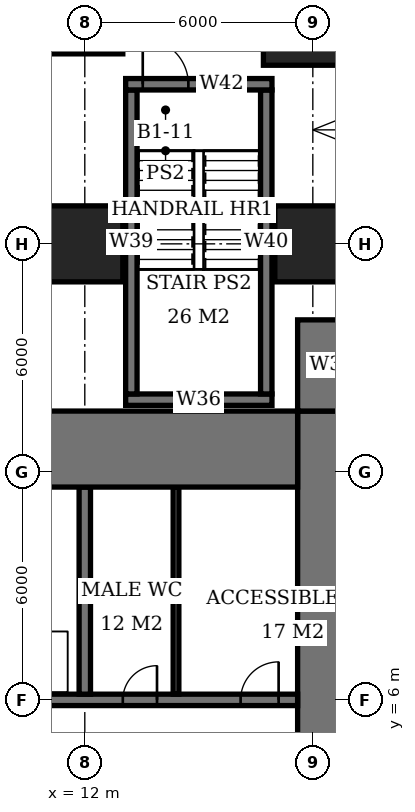
"""IFC4 building model, lengths in metres.
Left out: names, types, materials, properties, quantities, classifications, styles, units other than length and angle.
Written with IfcOpenShell. Run it as: python <this file> out.ifc"""

import sys

from ifc_helpers import new_model, si_unit, direction, frame, frame_2d, origin, origin_2d, place, context, subcontext, project, spatial, rectangle, extrude, element, fill, save


model = new_model("IFC4")
c1 = context("Model", 3, precision=1e-05, world=origin(), true_north=direction((0.0, 1.0)))
c2 = subcontext(c1, "Body", "Model", "MODEL_VIEW")
j1 = project(units=[si_unit("LENGTHUNIT", "METRE"), si_unit("PLANEANGLEUNIT", "RADIAN")], contexts=[c1])
p1 = place(None, origin())
s1 = spatial("IfcSite", under=j1, at=p1, CompositionType="ELEMENT")
p2 = place(p1, origin())
s2 = spatial("IfcBuilding", under=s1, at=p2, CompositionType="ELEMENT")
p3 = place(p2, frame((0.0, 0.0, -4.5)))
s3 = spatial("IfcBuildingStorey", under=s2, at=p3, CompositionType="ELEMENT", Elevation=-4.5)
p4 = place(p3, frame((12.0, 18.0, 0.0), z_axis=(0.0, 0.0, 1.0), x_axis=(1.0, 0.0, 0.0)))
e1 = element("IfcColumn", 1, at=p4, inside=s3, PredefinedType="COLUMN", context=c2, shape_type="SweptSolid", body=[
    extrude(rectangle(XDim=2.0, YDim=2.0, at=origin_2d()), origin(), (0.0, 0.0, 1.0), 4.5),
])
p5 = place(p3, frame((12.0, 24.0, 0.0), z_axis=(0.0, 0.0, 1.0), x_axis=(1.0, 0.0, 0.0)))
e2 = element("IfcColumn", 2, at=p5, inside=s3, PredefinedType="COLUMN", context=c2, shape_type="SweptSolid", body=[
    extrude(rectangle(XDim=2.0, YDim=2.0, at=origin_2d()), origin(), (0.0, 0.0, 1.0), 4.05),
])
p6 = place(p3, frame((18.0, 18.0, 0.0), z_axis=(0.0, 0.0, 1.0), x_axis=(1.0, 0.0, 0.0)))
e3 = element("IfcColumn", 3, at=p6, inside=s3, PredefinedType="COLUMN", context=c2, shape_type="SweptSolid", body=[
    extrude(rectangle(XDim=2.0, YDim=2.0, at=origin_2d()), origin(), (0.0, 0.0, 1.0), 4.5),
])
p7 = place(p3, frame((18.0, 24.0, 0.0), z_axis=(0.0, 0.0, 1.0), x_axis=(1.0, 0.0, 0.0)))
e4 = element("IfcColumn", 4, at=p7, inside=s3, PredefinedType="COLUMN", context=c2, shape_type="SweptSolid", body=[
    extrude(rectangle(XDim=2.6, YDim=2.6, at=origin_2d()), origin(), (0.0, 0.0, 1.0), 4.05),
])
p8 = place(p3, frame((-5.6, 12.6, 0.0), z_axis=(0.0, 0.0, 1.0), x_axis=(1.0, 0.0, 0.0)))
e5 = element("IfcWall", 5, at=p8, inside=s3, PredefinedType="SHEAR", context=c2, shape_type="SweptSolid", body=[
    extrude(rectangle(XDim=23.2, YDim=2.0, at=frame_2d((11.6, 0.0))), origin(), (0.0, 0.0, 1.0), 4.5),
])
p9 = place(p3, frame((18.5, -7.6, 0.0), z_axis=(0.0, 0.0, 1.0), x_axis=(0.0, 1.0, 0.0)))
e6 = element("IfcWall", 6, at=p9, inside=s3, PredefinedType="SHEAR", context=c2, shape_type="SweptSolid", body=[
    extrude(rectangle(XDim=21.2, YDim=1.8, at=frame_2d((10.6, 0.0))), origin(), (0.0, 0.0, 1.0), 4.5),
])
p10 = place(p9, frame((9.2, 0.0, 0.0)))
e7 = element("IfcOpeningElement", 7, at=p10, cuts=e6, PredefinedType="OPENING", context=c2, shape_type="SweptSolid", body=[
    extrude(rectangle(XDim=1.8, YDim=2.4, at=frame_2d((0.9, 1.2))), frame((0.0, 0.91, 0.0), z_axis=(0.0, -1.0, 0.0), x_axis=(1.0, 0.0, 0.0)), (0.0, 0.0, 1.0), 1.82),
])
p11 = place(p3, frame((18.5, 13.6, 0.0), z_axis=(0.0, 0.0, 1.0), x_axis=(0.0, 1.0, 0.0)))
e8 = element("IfcWall", 8, at=p11, inside=s3, PredefinedType="SHEAR", context=c2, shape_type="SweptSolid", body=[
    extrude(rectangle(XDim=2.4, YDim=1.8, at=frame_2d((1.2, 0.0))), origin(), (0.0, 0.0, 1.0), 4.5),
])
p12 = place(p3, frame((-0.15, 6.0, 0.0), z_axis=(0.0, 0.0, 1.0), x_axis=(1.0, 0.0, 0.0)))
e9 = element("IfcWall", 9, at=p12, inside=s3, PredefinedType="SHEAR", context=c2, shape_type="SweptSolid", body=[
    extrude(rectangle(XDim=17.75, YDim=0.3, at=frame_2d((8.875, 0.0))), origin(), (0.0, 0.0, 1.0), 4.5),
])
p13 = place(p12, frame((13.15, 0.0, 0.0)))
e10 = element("IfcOpeningElement", 10, at=p13, cuts=e9, PredefinedType="OPENING", context=c2, shape_type="SweptSolid", body=[
    extrude(rectangle(XDim=0.9, YDim=2.1, at=frame_2d((0.45, 1.05))), frame((0.0, 0.16, 0.0), z_axis=(0.0, -1.0, 0.0), x_axis=(1.0, 0.0, 0.0)), (0.0, 0.0, 1.0), 0.32),
])
p14 = place(p12, frame((16.25, 0.0, 0.0)))
e11 = element("IfcOpeningElement", 11, at=p14, cuts=e9, PredefinedType="OPENING", context=c2, shape_type="SweptSolid", body=[
    extrude(rectangle(XDim=1.0, YDim=2.1, at=frame_2d((0.5, 1.05))), frame((0.0, 0.16, 0.0), z_axis=(0.0, -1.0, 0.0), x_axis=(1.0, 0.0, 0.0)), (0.0, 0.0, 1.0), 0.32),
])
p15 = place(p12, frame((1.1, 0.0, 0.0)))
e12 = element("IfcOpeningElement", 12, at=p15, cuts=e9, PredefinedType="OPENING", context=c2, shape_type="SweptSolid", body=[
    extrude(rectangle(XDim=1.1, YDim=2.1, at=frame_2d((0.55, 1.05))), frame((0.0, 0.16, 0.0), z_axis=(0.0, -1.0, 0.0), x_axis=(1.0, 0.0, 0.0)), (0.0, 0.0, 1.0), 0.32),
])
p16 = place(p12, frame((4.1, 0.0, 0.0)))
e13 = element("IfcOpeningElement", 13, at=p16, cuts=e9, PredefinedType="OPENING", context=c2, shape_type="SweptSolid", body=[
    extrude(rectangle(XDim=1.1, YDim=2.1, at=frame_2d((0.55, 1.05))), frame((0.0, 0.16, 0.0), z_axis=(0.0, -1.0, 0.0), x_axis=(1.0, 0.0, 0.0)), (0.0, 0.0, 1.0), 0.32),
])
p17 = place(p12, frame((7.1, 0.0, 0.0)))
e14 = element("IfcOpeningElement", 14, at=p17, cuts=e9, PredefinedType="OPENING", context=c2, shape_type="SweptSolid", body=[
    extrude(rectangle(XDim=1.1, YDim=2.1, at=frame_2d((0.55, 1.05))), frame((0.0, 0.16, 0.0), z_axis=(0.0, -1.0, 0.0), x_axis=(1.0, 0.0, 0.0)), (0.0, 0.0, 1.0), 0.32),
])
p18 = place(p12, frame((10.1, 0.0, 0.0)))
e15 = element("IfcOpeningElement", 15, at=p18, cuts=e9, PredefinedType="OPENING", context=c2, shape_type="SweptSolid", body=[
    extrude(rectangle(XDim=1.1, YDim=2.1, at=frame_2d((0.55, 1.05))), frame((0.0, 0.16, 0.0), z_axis=(0.0, -1.0, 0.0), x_axis=(1.0, 0.0, 0.0)), (0.0, 0.0, 1.0), 0.32),
])
p19 = place(p3, frame((12.0, 6.15, 0.0), z_axis=(0.0, 0.0, 1.0), x_axis=(0.0, 1.0, 0.0)))
e16 = element("IfcWall", 16, at=p19, inside=s3, PredefinedType="SHEAR", context=c2, shape_type="SweptSolid", body=[
    extrude(rectangle(XDim=5.45, YDim=0.3, at=frame_2d((2.725, 0.0))), origin(), (0.0, 0.0, 1.0), 4.5),
])
p20 = place(p3, frame((14.4, 6.15, 0.0), z_axis=(0.0, 0.0, 1.0), x_axis=(0.0, 1.0, 0.0)))
e17 = element("IfcWall", 17, at=p20, inside=s3, PredefinedType="PLUMBINGWALL", context=c2, shape_type="SweptSolid", body=[
    extrude(rectangle(XDim=5.45, YDim=0.15, at=frame_2d((2.725, 0.0))), origin(), (0.0, 0.0, 1.0), 4.05),
])
p21 = place(p3, frame((13.075, 13.9, 0.0), z_axis=(0.0, 0.0, 1.0), x_axis=(1.0, 0.0, 0.0)))
e18 = element("IfcWall", 18, at=p21, inside=s3, PredefinedType="SOLIDWALL", context=c2, shape_type="SweptSolid", body=[
    extrude(rectangle(XDim=3.85, YDim=0.3, at=frame_2d((1.925, 0.0))), origin(), (0.0, 0.0, 1.0), 4.05),
])
p22 = place(p3, frame((13.075, 22.2, 0.0), z_axis=(0.0, 0.0, 1.0), x_axis=(1.0, 0.0, 0.0)))
e19 = element("IfcWall", 19, at=p22, inside=s3, PredefinedType="SOLIDWALL", context=c2, shape_type="SweptSolid", body=[
    extrude(rectangle(XDim=3.85, YDim=0.3, at=frame_2d((1.925, 0.0))), origin(), (0.0, 0.0, 1.0), 4.05),
])
p23 = place(p22, frame((0.45, 0.0, 0.0)))
e20 = element("IfcOpeningElement", 20, at=p23, cuts=e19, PredefinedType="OPENING", context=c2, shape_type="SweptSolid", body=[
    extrude(rectangle(XDim=1.2, YDim=2.1, at=frame_2d((0.6, 1.05))), frame((0.0, 0.16, 0.0), z_axis=(0.0, -1.0, 0.0), x_axis=(1.0, 0.0, 0.0)), (0.0, 0.0, 1.0), 0.32),
])
for number, where, z_axis, x_axis in (
    (21, (13.225, 14.05, 0.0), (0.0, 0.0, 1.0), (0.0, 1.0, 0.0)),
    (22, (16.775, 14.05, 0.0), (0.0, 0.0, 1.0), (0.0, 1.0, 0.0)),
):
    element("IfcWall", number, at=place(p3, frame(where, z_axis=z_axis, x_axis=x_axis)), inside=s3, PredefinedType="SOLIDWALL", context=c2, shape_type="SweptSolid", body=[
        extrude(rectangle(XDim=8.0, YDim=0.3, at=frame_2d((4.0, 0.0))), origin(), (0.0, 0.0, 1.0), 4.05),
    ])
p24 = place(p13, origin())
e23 = element("IfcDoor", 23, at=p24, inside=s3, OperationType="SINGLE_SWING_RIGHT", PredefinedType="DOOR", context=c2, shape_type="SweptSolid", body=[
    extrude(rectangle(XDim=0.9, YDim=2.1, at=frame_2d((0.45, 1.05))), frame((0.0, 0.025, 0.0), z_axis=(0.0, -1.0, 0.0), x_axis=(1.0, 0.0, 0.0)), (0.0, 0.0, 1.0), 0.05),
])
fill(e10, e23)
p25 = place(p14, origin())
e24 = element("IfcDoor", 24, at=p25, inside=s3, OperationType="SINGLE_SWING_RIGHT", PredefinedType="DOOR", context=c2, shape_type="SweptSolid", body=[
    extrude(rectangle(XDim=1.0, YDim=2.1, at=frame_2d((0.5, 1.05))), frame((0.0, 0.025, 0.0), z_axis=(0.0, -1.0, 0.0), x_axis=(1.0, 0.0, 0.0)), (0.0, 0.0, 1.0), 0.05),
])
fill(e11, e24)
p26 = place(p23, origin())
e25 = element("IfcDoor", 25, at=p26, inside=s3, OperationType="SINGLE_SWING_LEFT", PredefinedType="DOOR", context=c2, shape_type="SweptSolid", body=[
    extrude(rectangle(XDim=1.2, YDim=2.1, at=frame_2d((0.6, 1.05))), frame((0.0, 0.025, 0.0), z_axis=(0.0, -1.0, 0.0), x_axis=(1.0, 0.0, 0.0)), (0.0, 0.0, 1.0), 0.05),
])
fill(e20, e25)
save(model, sys.argv[1])
